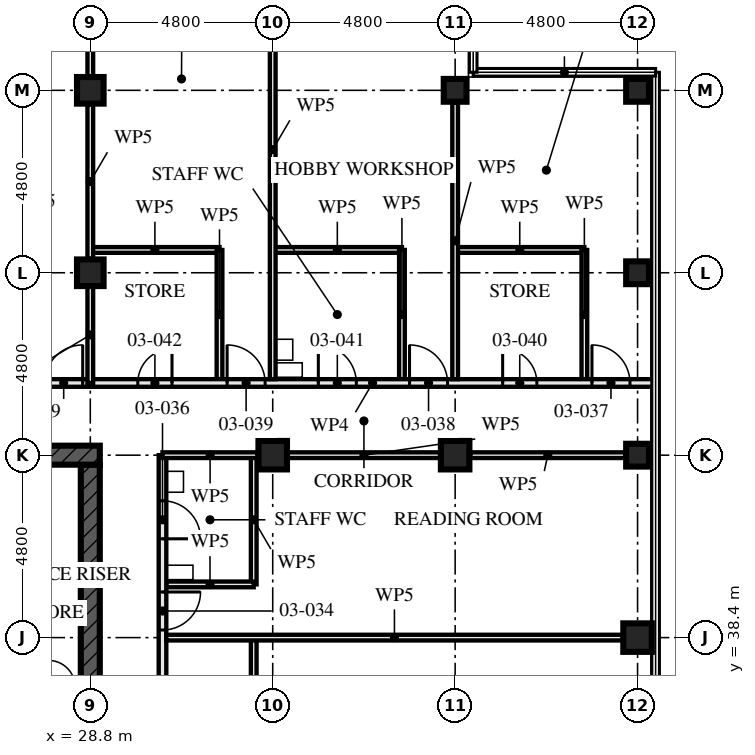
"""IFC4 building model, lengths in metres.
Left out: names, types, materials, properties, quantities, classifications, styles, units other than length and angle.
Written with IfcOpenShell. Run it as: python <this file> out.ifc"""

import sys

from ifc_helpers import new_model, si_unit, direction, frame, frame_2d, origin, origin_2d, place, context, subcontext, project, spatial, rectangle, hollow_rectangle, extrude, element, fill, save


model = new_model("IFC4")
c1 = context("Model", 3, precision=1e-05, world=origin(), true_north=direction((0.0, 1.0)))
c2 = subcontext(c1, "Body", "Model", "MODEL_VIEW")
j1 = project(units=[si_unit("LENGTHUNIT", "METRE"), si_unit("PLANEANGLEUNIT", "RADIAN")], contexts=[c1])
p1 = place(None, origin())
s1 = spatial("IfcSite", under=j1, at=p1, CompositionType="ELEMENT")
p2 = place(p1, origin())
s2 = spatial("IfcBuilding", under=s1, at=p2, CompositionType="ELEMENT")
p3 = place(p2, frame((0.0, 0.0, 13.5)))
s3 = spatial("IfcBuildingStorey", under=s2, at=p3, CompositionType="ELEMENT", Elevation=13.5)
for number, where, z_axis, x_axis in (
    (1, (28.8, 48.0, 0.0), (0.0, 0.0, 1.0), (1.0, 0.0, 0.0)),
    (2, (28.8, 52.8, 0.0), (0.0, 0.0, 1.0), (1.0, 0.0, 0.0)),
):
    element("IfcColumn", number, at=place(p3, frame(where, z_axis=z_axis, x_axis=x_axis)), inside=s3, PredefinedType="COLUMN", context=c2, shape_type="SweptSolid", body=[
        extrude(hollow_rectangle(XDim=0.7, YDim=0.7, WallThickness=0.06, at=origin_2d()), origin(), (0.0, 0.0, 1.0), 4.5),
    ])
for number, where, z_axis, x_axis in (
    (3, (33.6, 43.2, 0.0), (0.0, 0.0, 1.0), (0.0, 1.0, 0.0)),
    (4, (38.4, 43.2, 0.0), (0.0, 0.0, 1.0), (0.0, 1.0, 0.0)),
):
    element("IfcColumn", number, at=place(p3, frame(where, z_axis=z_axis, x_axis=x_axis)), inside=s3, PredefinedType="COLUMN", context=c2, shape_type="SweptSolid", body=[
        extrude(hollow_rectangle(XDim=0.75, YDim=0.75, WallThickness=0.08, at=origin_2d()), origin(), (0.0, 0.0, 1.0), 4.5),
    ])
p4 = place(p3, frame((38.4, 52.8, 0.0), z_axis=(0.0, 0.0, 1.0), x_axis=(0.0, 1.0, 0.0)))
e5 = element("IfcColumn", 5, at=p4, inside=s3, PredefinedType="COLUMN", context=c2, shape_type="SweptSolid", body=[
    extrude(hollow_rectangle(XDim=0.6, YDim=0.6, WallThickness=0.06, at=origin_2d()), origin(), (0.0, 0.0, 1.0), 4.5),
])
p5 = place(p3, frame((43.2, 38.4, 0.0), z_axis=(0.0, 0.0, 1.0), x_axis=(1.0, 0.0, 0.0)))
e6 = element("IfcColumn", 6, at=p5, inside=s3, PredefinedType="COLUMN", context=c2, shape_type="SweptSolid", body=[
    extrude(hollow_rectangle(XDim=0.75, YDim=0.75, WallThickness=0.08, at=origin_2d()), origin(), (0.0, 0.0, 1.0), 4.5),
])
for number, where, z_axis, x_axis in (
    (7, (43.2, 43.2, 0.0), (0.0, 0.0, 1.0), (0.0, 1.0, 0.0)),
    (8, (43.2, 48.0, 0.0), (0.0, 0.0, 1.0), (1.0, 0.0, 0.0)),
):
    element("IfcColumn", number, at=place(p3, frame(where, z_axis=z_axis, x_axis=x_axis)), inside=s3, PredefinedType="COLUMN", context=c2, shape_type="SweptSolid", body=[
        extrude(hollow_rectangle(XDim=0.6, YDim=0.6, WallThickness=0.08, at=origin_2d()), origin(), (0.0, 0.0, 1.0), 4.5),
    ])
p6 = place(p3, frame((43.2, 52.8, 0.0), z_axis=(0.0, 0.0, 1.0), x_axis=(0.0, 1.0, 0.0)))
e9 = element("IfcColumn", 9, at=p6, inside=s3, PredefinedType="COLUMN", context=c2, shape_type="SweptSolid", body=[
    extrude(hollow_rectangle(XDim=0.6, YDim=0.6, WallThickness=0.06, at=origin_2d()), origin(), (0.0, 0.0, 1.0), 4.5),
])
p7 = place(p3, frame((29.05, 43.2, -0.17), z_axis=(0.0, 0.0, 1.0), x_axis=(-1.0, 0.0, 0.0)))
e10 = element("IfcWall", 10, at=p7, inside=s3, PredefinedType="SHEAR", context=c2, shape_type="SweptSolid", body=[
    extrude(rectangle(XDim=14.9, YDim=0.5, at=frame_2d((7.45, 0.0))), origin(), (0.0, 0.0, 1.0), 4.5),
])
p8 = place(p7, frame((6.85, 0.0, 0.17)))
e11 = element("IfcOpeningElement", 11, at=p8, cuts=e10, PredefinedType="OPENING", context=c2, shape_type="SweptSolid", body=[
    extrude(rectangle(XDim=1.2, YDim=2.1, at=frame_2d((0.6, 1.05))), frame((0.0, 0.26, 0.0), z_axis=(0.0, -1.0, 0.0), x_axis=(1.0, 0.0, 0.0)), (0.0, 0.0, 1.0), 0.521),
])
p9 = place(p3, frame((28.8, 29.05, -0.17), z_axis=(0.0, 0.0, 1.0), x_axis=(0.0, 1.0, 0.0)))
e12 = element("IfcWall", 12, at=p9, inside=s3, PredefinedType="SHEAR", context=c2, shape_type="SweptSolid", body=[
    extrude(rectangle(XDim=13.9, YDim=0.5, at=frame_2d((6.95, 0.0))), origin(), (0.0, 0.0, 1.0), 4.5),
])
p10 = place(p9, frame((6.35, 0.0, 0.17)))
e13 = element("IfcOpeningElement", 13, at=p10, cuts=e12, PredefinedType="OPENING", context=c2, shape_type="SweptSolid", body=[
    extrude(rectangle(XDim=1.2, YDim=2.1, at=frame_2d((0.6, 1.05))), frame((0.0, 0.26, 0.0), z_axis=(0.0, -1.0, 0.0), x_axis=(1.0, 0.0, 0.0)), (0.0, 0.0, 1.0), 0.521),
])
p11 = place(p3, frame((28.8, 45.1, 0.0), z_axis=(0.0, 0.0, 1.0), x_axis=(-1.0, 0.0, 0.0)))
e14 = element("IfcWall", 14, at=p11, inside=s3, PredefinedType="PARTITIONING", context=c2, shape_type="SweptSolid", body=[
    extrude(rectangle(XDim=14.4, YDim=0.2, at=frame_2d((7.2, 0.0))), origin(), (0.0, 0.0, 1.0), 4.33),
])
p12 = place(p11, frame((0.2, 0.0, 0.0)))
e15 = element("IfcOpeningElement", 15, at=p12, cuts=e14, PredefinedType="OPENING", context=c2, shape_type="SweptSolid", body=[
    extrude(rectangle(XDim=1.0, YDim=2.4, at=frame_2d((0.5, 1.2))), frame((0.0, 0.111, 0.0), z_axis=(0.0, -1.0, 0.0), x_axis=(1.0, 0.0, 0.0)), (0.0, 0.0, 1.0), 0.221),
])
p13 = place(p11, frame((5.0, 0.0, 0.0)))
e16 = element("IfcOpeningElement", 16, at=p13, cuts=e14, PredefinedType="OPENING", context=c2, shape_type="SweptSolid", body=[
    extrude(rectangle(XDim=1.0, YDim=2.4, at=frame_2d((0.5, 1.2))), frame((0.0, 0.111, 0.0), z_axis=(0.0, -1.0, 0.0), x_axis=(1.0, 0.0, 0.0)), (0.0, 0.0, 1.0), 0.221),
])
p14 = place(p11, frame((9.8, 0.0, 0.0)))
e17 = element("IfcOpeningElement", 17, at=p14, cuts=e14, PredefinedType="OPENING", context=c2, shape_type="SweptSolid", body=[
    extrude(rectangle(XDim=1.0, YDim=2.4, at=frame_2d((0.5, 1.2))), frame((0.0, 0.111, 0.0), z_axis=(0.0, -1.0, 0.0), x_axis=(1.0, 0.0, 0.0)), (0.0, 0.0, 1.0), 0.221),
])
p15 = place(p11, frame((2.65, 0.0, 0.0)))
e18 = element("IfcOpeningElement", 18, at=p15, cuts=e14, PredefinedType="OPENING", context=c2, shape_type="SweptSolid", body=[
    extrude(rectangle(XDim=0.9, YDim=2.1, at=frame_2d((0.45, 1.05))), frame((0.0, 0.111, 0.0), z_axis=(0.0, -1.0, 0.0), x_axis=(1.0, 0.0, 0.0)), (0.0, 0.0, 1.0), 0.221),
])
p16 = place(p11, frame((7.4, 0.0, 0.0)))
e19 = element("IfcOpeningElement", 19, at=p16, cuts=e14, PredefinedType="OPENING", context=c2, shape_type="SweptSolid", body=[
    extrude(rectangle(XDim=1.0, YDim=2.1, at=frame_2d((0.5, 1.05))), frame((0.0, 0.111, 0.0), z_axis=(0.0, -1.0, 0.0), x_axis=(1.0, 0.0, 0.0)), (0.0, 0.0, 1.0), 0.221),
])
p17 = place(p11, frame((12.25, 0.0, 0.0)))
e20 = element("IfcOpeningElement", 20, at=p17, cuts=e14, PredefinedType="OPENING", context=c2, shape_type="SweptSolid", body=[
    extrude(rectangle(XDim=0.9, YDim=2.1, at=frame_2d((0.45, 1.05))), frame((0.0, 0.111, 0.0), z_axis=(0.0, -1.0, 0.0), x_axis=(1.0, 0.0, 0.0)), (0.0, 0.0, 1.0), 0.221),
])
p18 = place(p3, frame((33.1, 35.0, 0.0), z_axis=(0.0, 0.0, 1.0), x_axis=(0.0, 1.0, 0.0)))
e21 = element("IfcWall", 21, at=p18, inside=s3, PredefinedType="PARTITIONING", context=c2, shape_type="SweptSolid", body=[
    extrude(rectangle(XDim=3.4, YDim=0.15, at=frame_2d((1.7, 0.0))), origin(), (0.0, 0.0, 1.0), 4.33),
])
p19 = place(p3, frame((33.1, 39.8, 0.0), z_axis=(0.0, 0.0, 1.0), x_axis=(-1.0, 0.0, 0.0)))
e22 = element("IfcWall", 22, at=p19, inside=s3, PredefinedType="PARTITIONING", context=c2, shape_type="SweptSolid", body=[
    extrude(rectangle(XDim=2.3, YDim=0.15, at=frame_2d((1.15, 0.0))), origin(), (0.0, 0.0, 1.0), 4.33),
])
p20 = place(p3, frame((33.1, 39.8, 0.0), z_axis=(0.0, 0.0, 1.0), x_axis=(0.0, 1.0, 0.0)))
e23 = element("IfcWall", 23, at=p20, inside=s3, PredefinedType="PARTITIONING", context=c2, shape_type="SweptSolid", body=[
    extrude(rectangle(XDim=3.4, YDim=0.15, at=frame_2d((1.7, 0.0))), origin(), (0.0, 0.0, 1.0), 4.33),
])
p21 = place(p3, frame((42.805, 38.4, 0.0), z_axis=(0.0, 0.0, 1.0), x_axis=(-1.0, 0.0, 0.0)))
e24 = element("IfcWall", 24, at=p21, inside=s3, PredefinedType="PARTITIONING", context=c2, shape_type="SweptSolid", body=[
    extrude(rectangle(XDim=12.005, YDim=0.15, at=frame_2d((6.002, 0.0))), origin(), (0.0, 0.0, 1.0), 3.55),
])
p22 = place(p3, frame((30.7, 28.8, 0.0), z_axis=(0.0, 0.0, 1.0), x_axis=(0.0, 1.0, 0.0)))
e25 = element("IfcWall", 25, at=p22, inside=s3, PredefinedType="PARTITIONING", context=c2, shape_type="SweptSolid", body=[
    extrude(rectangle(XDim=14.4, YDim=0.2, at=frame_2d((7.2, 0.0))), origin(), (0.0, 0.0, 1.0), 3.55),
])
p23 = place(p22, frame((1.4, 0.0, 0.0)))
e26 = element("IfcOpeningElement", 26, at=p23, cuts=e25, PredefinedType="OPENING", context=c2, shape_type="SweptSolid", body=[
    extrude(rectangle(XDim=1.0, YDim=2.1, at=frame_2d((0.5, 1.05))), frame((0.0, 0.111, 0.0), z_axis=(0.0, -1.0, 0.0), x_axis=(1.0, 0.0, 0.0)), (0.0, 0.0, 1.0), 0.221),
])
p24 = place(p22, frame((3.6, 0.0, 0.0)))
e27 = element("IfcOpeningElement", 27, at=p24, cuts=e25, PredefinedType="OPENING", context=c2, shape_type="SweptSolid", body=[
    extrude(rectangle(XDim=1.0, YDim=2.4, at=frame_2d((0.5, 1.2))), frame((0.0, 0.111, 0.0), z_axis=(0.0, -1.0, 0.0), x_axis=(1.0, 0.0, 0.0)), (0.0, 0.0, 1.0), 0.221),
])
p25 = place(p22, frame((5.0, 0.0, 0.0)))
e28 = element("IfcOpeningElement", 28, at=p25, cuts=e25, PredefinedType="OPENING", context=c2, shape_type="SweptSolid", body=[
    extrude(rectangle(XDim=1.0, YDim=2.4, at=frame_2d((0.5, 1.2))), frame((0.0, 0.111, 0.0), z_axis=(0.0, -1.0, 0.0), x_axis=(1.0, 0.0, 0.0)), (0.0, 0.0, 1.0), 0.221),
])
p26 = place(p22, frame((9.8, 0.0, 0.0)))
e29 = element("IfcOpeningElement", 29, at=p26, cuts=e25, PredefinedType="OPENING", context=c2, shape_type="SweptSolid", body=[
    extrude(rectangle(XDim=1.0, YDim=2.4, at=frame_2d((0.5, 1.2))), frame((0.0, 0.111, 0.0), z_axis=(0.0, -1.0, 0.0), x_axis=(1.0, 0.0, 0.0)), (0.0, 0.0, 1.0), 0.221),
])
p27 = place(p22, frame((7.45, 0.0, 0.0)))
e30 = element("IfcOpeningElement", 30, at=p27, cuts=e25, PredefinedType="OPENING", context=c2, shape_type="SweptSolid", body=[
    extrude(rectangle(XDim=0.9, YDim=2.1, at=frame_2d((0.45, 1.05))), frame((0.0, 0.111, 0.0), z_axis=(0.0, -1.0, 0.0), x_axis=(1.0, 0.0, 0.0)), (0.0, 0.0, 1.0), 0.221),
])
p28 = place(p22, frame((12.2, 0.0, 0.0)))
e31 = element("IfcOpeningElement", 31, at=p28, cuts=e25, PredefinedType="OPENING", context=c2, shape_type="SweptSolid", body=[
    extrude(rectangle(XDim=1.0, YDim=2.1, at=frame_2d((0.5, 1.05))), frame((0.0, 0.111, 0.0), z_axis=(0.0, -1.0, 0.0), x_axis=(1.0, 0.0, 0.0)), (0.0, 0.0, 1.0), 0.221),
])
p29 = place(p3, frame((41.8, 48.6, 0.0), z_axis=(0.0, 0.0, 1.0), x_axis=(0.0, -1.0, 0.0)))
e32 = element("IfcWall", 32, at=p29, inside=s3, PredefinedType="PARTITIONING", context=c2, shape_type="SweptSolid", body=[
    extrude(rectangle(XDim=3.4, YDim=0.15, at=frame_2d((1.7, 0.0))), origin(), (0.0, 0.0, 1.0), 3.55),
])
p30 = place(p3, frame((41.8, 48.6, 0.0), z_axis=(0.0, 0.0, 1.0), x_axis=(-1.0, 0.0, 0.0)))
e33 = element("IfcWall", 33, at=p30, inside=s3, PredefinedType="PARTITIONING", context=c2, shape_type="SweptSolid", body=[
    extrude(rectangle(XDim=3.4, YDim=0.15, at=frame_2d((1.7, 0.0))), origin(), (0.0, 0.0, 1.0), 4.33),
])
p31 = place(p3, frame((37.0, 48.6, 0.0), z_axis=(0.0, 0.0, 1.0), x_axis=(0.0, -1.0, 0.0)))
e34 = element("IfcWall", 34, at=p31, inside=s3, PredefinedType="PARTITIONING", context=c2, shape_type="SweptSolid", body=[
    extrude(rectangle(XDim=3.4, YDim=0.15, at=frame_2d((1.7, 0.0))), origin(), (0.0, 0.0, 1.0), 3.55),
])
p32 = place(p3, frame((37.0, 48.6, 0.0), z_axis=(0.0, 0.0, 1.0), x_axis=(-1.0, 0.0, 0.0)))
e35 = element("IfcWall", 35, at=p32, inside=s3, PredefinedType="PARTITIONING", context=c2, shape_type="SweptSolid", body=[
    extrude(rectangle(XDim=3.4, YDim=0.15, at=frame_2d((1.7, 0.0))), origin(), (0.0, 0.0, 1.0), 4.33),
])
p33 = place(p3, frame((32.2, 48.6, 0.0), z_axis=(0.0, 0.0, 1.0), x_axis=(0.0, -1.0, 0.0)))
e36 = element("IfcWall", 36, at=p33, inside=s3, PredefinedType="PARTITIONING", context=c2, shape_type="SweptSolid", body=[
    extrude(rectangle(XDim=3.4, YDim=0.15, at=frame_2d((1.7, 0.0))), origin(), (0.0, 0.0, 1.0), 3.55),
])
p34 = place(p3, frame((32.2, 48.6, 0.0), z_axis=(0.0, 0.0, 1.0), x_axis=(-1.0, 0.0, 0.0)))
e37 = element("IfcWall", 37, at=p34, inside=s3, PredefinedType="PARTITIONING", context=c2, shape_type="SweptSolid", body=[
    extrude(rectangle(XDim=3.4, YDim=0.15, at=frame_2d((1.7, 0.0))), origin(), (0.0, 0.0, 1.0), 4.33),
])
p35 = place(p3, frame((38.4, 52.48, 0.0), z_axis=(0.0, 0.0, 1.0), x_axis=(0.0, -1.0, 0.0)))
e38 = element("IfcWall", 38, at=p35, inside=s3, PredefinedType="PARTITIONING", context=c2, shape_type="SweptSolid", body=[
    extrude(rectangle(XDim=7.28, YDim=0.15, at=frame_2d((3.64, 0.0))), origin(), (0.0, 0.0, 1.0), 3.55),
])
p36 = place(p3, frame((33.6, 57.28, 0.0), z_axis=(0.0, 0.0, 1.0), x_axis=(0.0, -1.0, 0.0)))
e39 = element("IfcWall", 39, at=p36, inside=s3, PredefinedType="PARTITIONING", context=c2, shape_type="SweptSolid", body=[
    extrude(rectangle(XDim=12.08, YDim=0.15, at=frame_2d((6.04, 0.0))), origin(), (0.0, 0.0, 1.0), 3.55),
])
p37 = place(p3, frame((43.655, 45.1, 0.0), z_axis=(0.0, 0.0, 1.0), x_axis=(-1.0, 0.0, 0.0)))
e40 = element("IfcWall", 40, at=p37, inside=s3, PredefinedType="PARTITIONING", context=c2, shape_type="SweptSolid", body=[
    extrude(rectangle(XDim=14.855, YDim=0.2, at=frame_2d((7.427, 0.0))), origin(), (0.0, 0.0, 1.0), 3.32),
])
p38 = place(p37, frame((0.655, 0.0, 0.0)))
e41 = element("IfcOpeningElement", 41, at=p38, cuts=e40, PredefinedType="OPENING", context=c2, shape_type="SweptSolid", body=[
    extrude(rectangle(XDim=1.0, YDim=2.4, at=frame_2d((0.5, 1.2))), frame((0.0, 0.111, 0.0), z_axis=(0.0, -1.0, 0.0), x_axis=(1.0, 0.0, 0.0)), (0.0, 0.0, 1.0), 0.221),
])
p39 = place(p37, frame((5.455, 0.0, 0.0)))
e42 = element("IfcOpeningElement", 42, at=p39, cuts=e40, PredefinedType="OPENING", context=c2, shape_type="SweptSolid", body=[
    extrude(rectangle(XDim=1.0, YDim=2.4, at=frame_2d((0.5, 1.2))), frame((0.0, 0.111, 0.0), z_axis=(0.0, -1.0, 0.0), x_axis=(1.0, 0.0, 0.0)), (0.0, 0.0, 1.0), 0.221),
])
p40 = place(p37, frame((10.255, 0.0, 0.0)))
e43 = element("IfcOpeningElement", 43, at=p40, cuts=e40, PredefinedType="OPENING", context=c2, shape_type="SweptSolid", body=[
    extrude(rectangle(XDim=1.0, YDim=2.4, at=frame_2d((0.5, 1.2))), frame((0.0, 0.111, 0.0), z_axis=(0.0, -1.0, 0.0), x_axis=(1.0, 0.0, 0.0)), (0.0, 0.0, 1.0), 0.221),
])
p41 = place(p37, frame((3.105, 0.0, 0.0)))
e44 = element("IfcOpeningElement", 44, at=p41, cuts=e40, PredefinedType="OPENING", context=c2, shape_type="SweptSolid", body=[
    extrude(rectangle(XDim=0.9, YDim=2.1, at=frame_2d((0.45, 1.05))), frame((0.0, 0.111, 0.0), z_axis=(0.0, -1.0, 0.0), x_axis=(1.0, 0.0, 0.0)), (0.0, 0.0, 1.0), 0.221),
])
p42 = place(p37, frame((7.855, 0.0, 0.0)))
e45 = element("IfcOpeningElement", 45, at=p42, cuts=e40, PredefinedType="OPENING", context=c2, shape_type="SweptSolid", body=[
    extrude(rectangle(XDim=1.0, YDim=2.1, at=frame_2d((0.5, 1.05))), frame((0.0, 0.111, 0.0), z_axis=(0.0, -1.0, 0.0), x_axis=(1.0, 0.0, 0.0)), (0.0, 0.0, 1.0), 0.221),
])
p43 = place(p37, frame((12.705, 0.0, 0.0)))
e46 = element("IfcOpeningElement", 46, at=p43, cuts=e40, PredefinedType="OPENING", context=c2, shape_type="SweptSolid", body=[
    extrude(rectangle(XDim=0.9, YDim=2.1, at=frame_2d((0.45, 1.05))), frame((0.0, 0.111, 0.0), z_axis=(0.0, -1.0, 0.0), x_axis=(1.0, 0.0, 0.0)), (0.0, 0.0, 1.0), 0.221),
])
p44 = place(p3, frame((28.8, 45.1, 0.0), z_axis=(0.0, 0.0, 1.0), x_axis=(0.0, 1.0, 0.0)))
e47 = element("IfcWall", 47, at=p44, inside=s3, PredefinedType="PARTITIONING", context=c2, shape_type="SweptSolid", body=[
    extrude(rectangle(XDim=2.53, YDim=0.15, at=frame_2d((1.265, 0.0))), origin(), (0.0, 0.0, 1.0), 3.32),
])
p45 = place(p3, frame((28.8, 48.37, 0.0), z_axis=(0.0, 0.0, 1.0), x_axis=(0.0, 1.0, 0.0)))
e48 = element("IfcWall", 48, at=p45, inside=s3, PredefinedType="PARTITIONING", context=c2, shape_type="SweptSolid", body=[
    extrude(rectangle(XDim=4.06, YDim=0.15, at=frame_2d((2.03, 0.0))), origin(), (0.0, 0.0, 1.0), 3.32),
])
p46 = place(p3, frame((28.8, 53.17, 0.0), z_axis=(0.0, 0.0, 1.0), x_axis=(0.0, 1.0, 0.0)))
e49 = element("IfcWall", 49, at=p46, inside=s3, PredefinedType="PARTITIONING", context=c2, shape_type="SweptSolid", body=[
    extrude(rectangle(XDim=4.11, YDim=0.15, at=frame_2d((2.055, 0.0))), origin(), (0.0, 0.0, 1.0), 3.32),
])
p47 = place(p3, frame((42.88, 43.2, 0.0), z_axis=(0.0, 0.0, 1.0), x_axis=(-1.0, 0.0, 0.0)))
e50 = element("IfcWall", 50, at=p47, inside=s3, PredefinedType="PARTITIONING", context=c2, shape_type="SweptSolid", body=[
    extrude(rectangle(XDim=4.085, YDim=0.15, at=frame_2d((2.042, 0.0))), origin(), (0.0, 0.0, 1.0), 3.32),
])
p48 = place(p3, frame((38.005, 43.2, 0.0), z_axis=(0.0, 0.0, 1.0), x_axis=(-1.0, 0.0, 0.0)))
e51 = element("IfcWall", 51, at=p48, inside=s3, PredefinedType="PARTITIONING", context=c2, shape_type="SweptSolid", body=[
    extrude(rectangle(XDim=4.01, YDim=0.15, at=frame_2d((2.005, 0.0))), origin(), (0.0, 0.0, 1.0), 3.32),
])
p49 = place(p3, frame((33.205, 43.2, 0.0), z_axis=(0.0, 0.0, 1.0), x_axis=(-1.0, 0.0, 0.0)))
e52 = element("IfcWall", 52, at=p49, inside=s3, PredefinedType="PARTITIONING", context=c2, shape_type="SweptSolid", body=[
    extrude(rectangle(XDim=2.505, YDim=0.15, at=frame_2d((1.252, 0.0))), origin(), (0.0, 0.0, 1.0), 3.32),
])
p50 = place(p12, frame((1.0, 0.0, 0.0), z_axis=(0.0, 0.0, 1.0), x_axis=(-1.0, 0.0, 0.0)))
e53 = element("IfcDoor", 53, at=p50, inside=s3, OperationType="SINGLE_SWING_LEFT", PredefinedType="DOOR", context=c2, shape_type="SweptSolid", body=[
    extrude(rectangle(XDim=1.0, YDim=2.4, at=frame_2d((0.5, 1.2))), frame((0.0, 0.027, 0.0), z_axis=(0.0, -1.0, 0.0), x_axis=(1.0, 0.0, 0.0)), (0.0, 0.0, 1.0), 0.054),
])
fill(e15, e53)
p51 = place(p26, frame((1.0, 0.0, 0.0), z_axis=(0.0, 0.0, 1.0), x_axis=(-1.0, 0.0, 0.0)))
e54 = element("IfcDoor", 54, at=p51, inside=s3, OperationType="SINGLE_SWING_RIGHT", PredefinedType="DOOR", context=c2, shape_type="SweptSolid", body=[
    extrude(rectangle(XDim=1.0, YDim=2.4, at=frame_2d((0.5, 1.2))), frame((0.0, 0.027, 0.0), z_axis=(0.0, -1.0, 0.0), x_axis=(1.0, 0.0, 0.0)), (0.0, 0.0, 1.0), 0.054),
])
fill(e29, e54)
p52 = place(p28, frame((1.0, 0.0, 0.0), z_axis=(0.0, 0.0, 1.0), x_axis=(-1.0, 0.0, 0.0)))
e55 = element("IfcDoor", 55, at=p52, inside=s3, OperationType="SINGLE_SWING_LEFT", PredefinedType="DOOR", context=c2, shape_type="SweptSolid", body=[
    extrude(rectangle(XDim=1.0, YDim=2.1, at=frame_2d((0.5, 1.05))), frame((0.0, 0.027, 0.0), z_axis=(0.0, -1.0, 0.0), x_axis=(1.0, 0.0, 0.0)), (0.0, 0.0, 1.0), 0.054),
])
fill(e31, e55)
p53 = place(p38, frame((1.0, 0.0, 0.0), z_axis=(0.0, 0.0, 1.0), x_axis=(-1.0, 0.0, 0.0)))
e56 = element("IfcDoor", 56, at=p53, inside=s3, OperationType="SINGLE_SWING_RIGHT", PredefinedType="DOOR", context=c2, shape_type="SweptSolid", body=[
    extrude(rectangle(XDim=1.0, YDim=2.4, at=frame_2d((0.5, 1.2))), frame((0.0, 0.027, 0.0), z_axis=(0.0, -1.0, 0.0), x_axis=(1.0, 0.0, 0.0)), (0.0, 0.0, 1.0), 0.054),
])
fill(e41, e56)
p54 = place(p39, frame((1.0, 0.0, 0.0), z_axis=(0.0, 0.0, 1.0), x_axis=(-1.0, 0.0, 0.0)))
e57 = element("IfcDoor", 57, at=p54, inside=s3, OperationType="SINGLE_SWING_RIGHT", PredefinedType="DOOR", context=c2, shape_type="SweptSolid", body=[
    extrude(rectangle(XDim=1.0, YDim=2.4, at=frame_2d((0.5, 1.2))), frame((0.0, 0.027, 0.0), z_axis=(0.0, -1.0, 0.0), x_axis=(1.0, 0.0, 0.0)), (0.0, 0.0, 1.0), 0.054),
])
fill(e42, e57)
p55 = place(p40, frame((1.0, 0.0, 0.0), z_axis=(0.0, 0.0, 1.0), x_axis=(-1.0, 0.0, 0.0)))
e58 = element("IfcDoor", 58, at=p55, inside=s3, OperationType="SINGLE_SWING_RIGHT", PredefinedType="DOOR", context=c2, shape_type="SweptSolid", body=[
    extrude(rectangle(XDim=1.0, YDim=2.4, at=frame_2d((0.5, 1.2))), frame((0.0, 0.027, 0.0), z_axis=(0.0, -1.0, 0.0), x_axis=(1.0, 0.0, 0.0)), (0.0, 0.0, 1.0), 0.054),
])
fill(e43, e58)
p56 = place(p41, frame((0.9, 0.0, 0.0), z_axis=(0.0, 0.0, 1.0), x_axis=(-1.0, 0.0, 0.0)))
e59 = element("IfcDoor", 59, at=p56, inside=s3, OperationType="SINGLE_SWING_RIGHT", PredefinedType="DOOR", context=c2, shape_type="SweptSolid", body=[
    extrude(rectangle(XDim=0.9, YDim=2.1, at=frame_2d((0.45, 1.05))), frame((0.0, 0.027, 0.0), z_axis=(0.0, -1.0, 0.0), x_axis=(1.0, 0.0, 0.0)), (0.0, 0.0, 1.0), 0.054),
])
fill(e44, e59)
p57 = place(p42, frame((1.0, 0.0, 0.0), z_axis=(0.0, 0.0, 1.0), x_axis=(-1.0, 0.0, 0.0)))
e60 = element("IfcDoor", 60, at=p57, inside=s3, OperationType="SINGLE_SWING_RIGHT", PredefinedType="DOOR", context=c2, shape_type="SweptSolid", body=[
    extrude(rectangle(XDim=1.0, YDim=2.1, at=frame_2d((0.5, 1.05))), frame((0.0, 0.027, 0.0), z_axis=(0.0, -1.0, 0.0), x_axis=(1.0, 0.0, 0.0)), (0.0, 0.0, 1.0), 0.054),
])
fill(e45, e60)
p58 = place(p43, frame((0.9, 0.0, 0.0), z_axis=(0.0, 0.0, 1.0), x_axis=(-1.0, 0.0, 0.0)))
e61 = element("IfcDoor", 61, at=p58, inside=s3, OperationType="SINGLE_SWING_LEFT", PredefinedType="DOOR", context=c2, shape_type="SweptSolid", body=[
    extrude(rectangle(XDim=0.9, YDim=2.1, at=frame_2d((0.45, 1.05))), frame((0.0, 0.027, 0.0), z_axis=(0.0, -1.0, 0.0), x_axis=(1.0, 0.0, 0.0)), (0.0, 0.0, 1.0), 0.054),
])
fill(e46, e61)
save(model, sys.argv[1])
